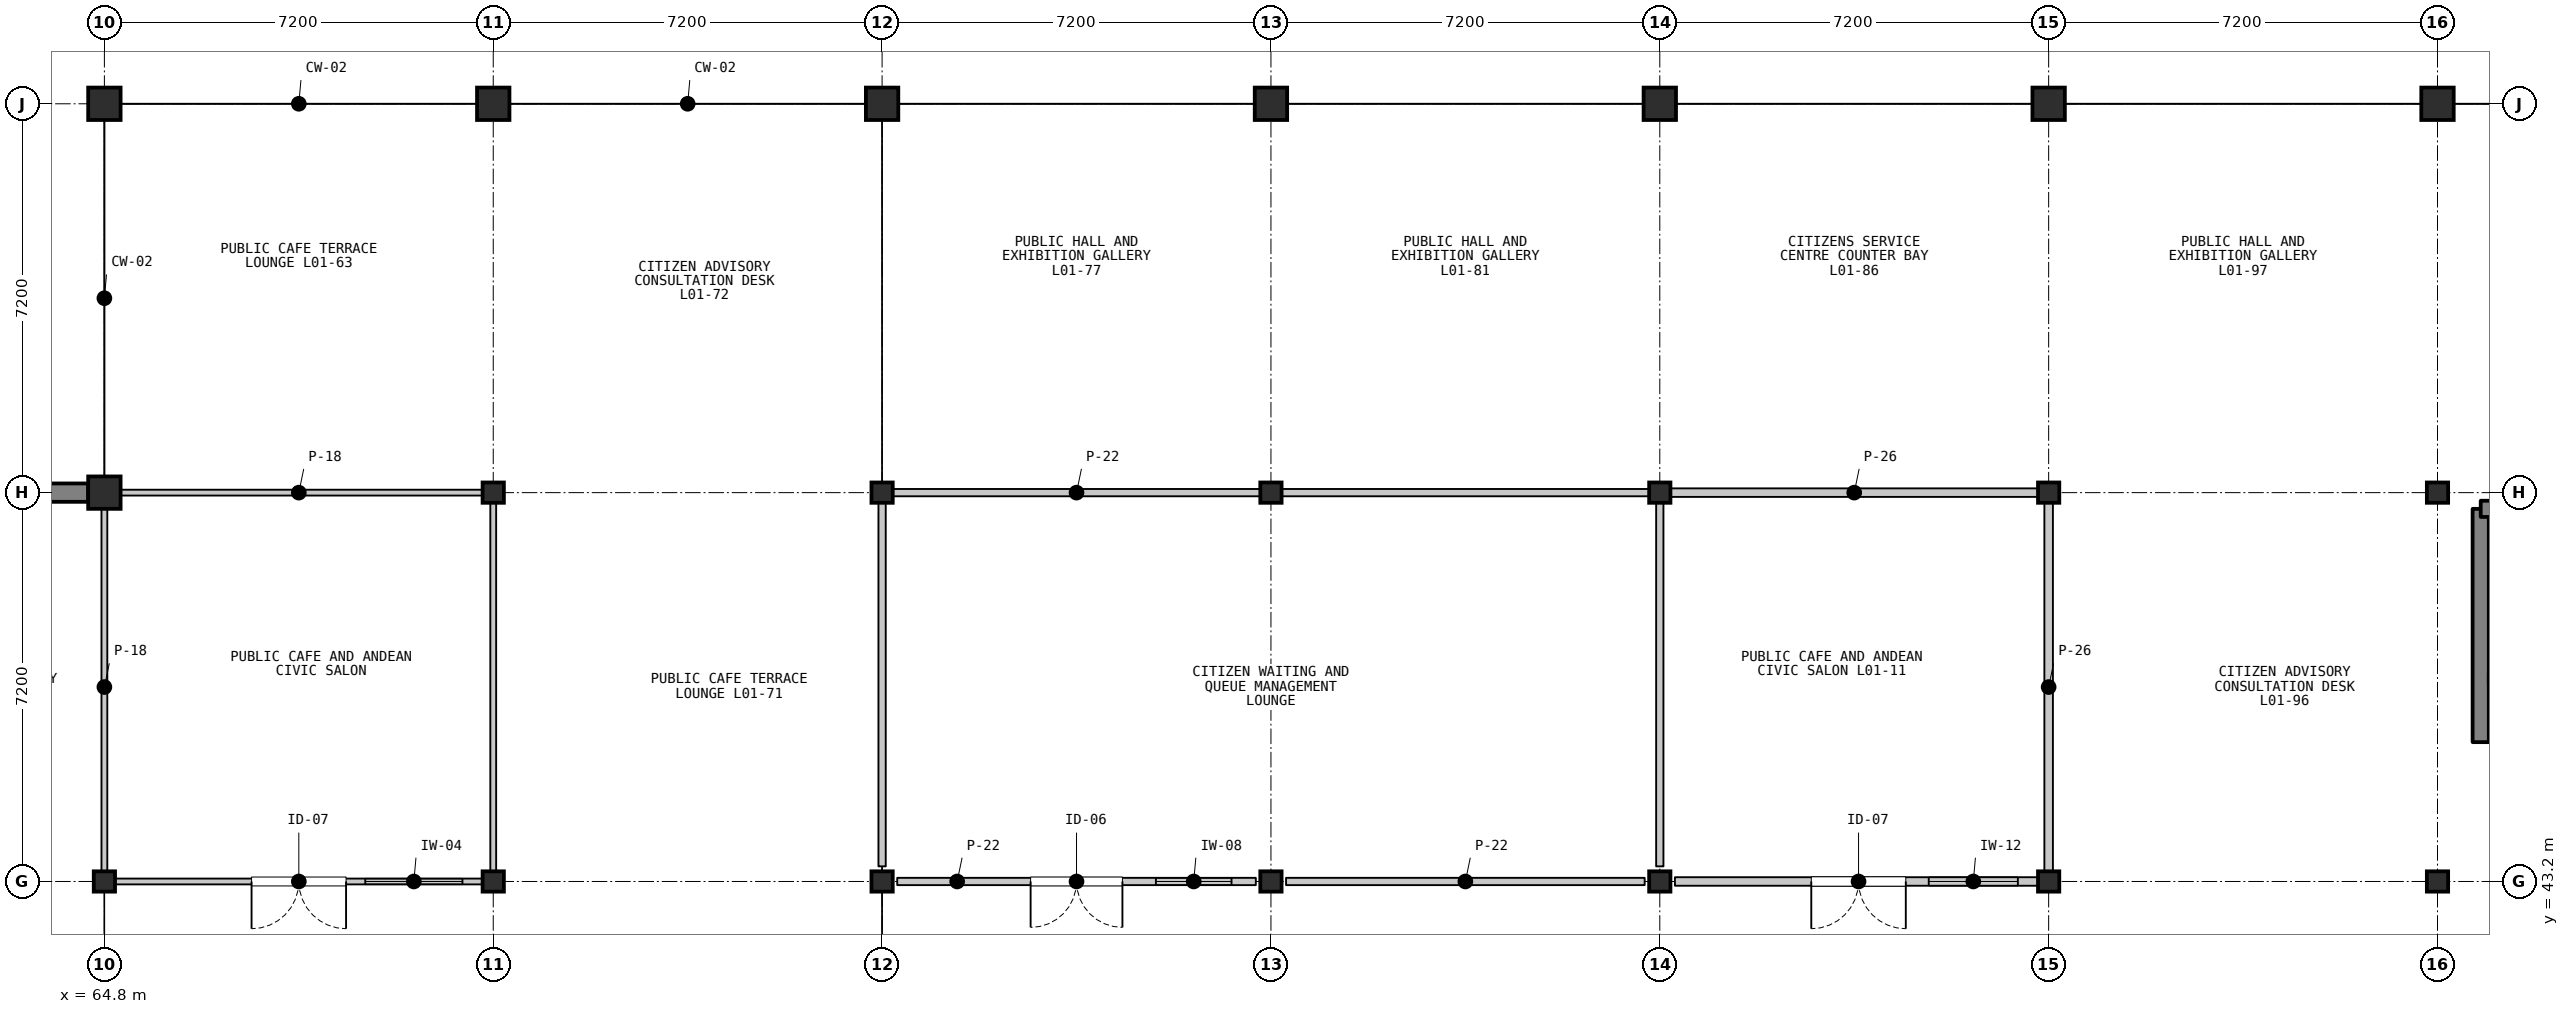
"""IFC4 building model, lengths in metres.
Left out: names, types, materials, properties, quantities, classifications, styles, units other than length and angle.
Written with IfcOpenShell. Run it as: python <this file> out.ifc"""

import sys

from ifc_helpers import new_model, si_unit, direction, frame, frame_2d, origin, origin_2d, place, context, subcontext, project, spatial, rectangle, i_section, extrude, element, fill, save


model = new_model("IFC4")
c1 = context("Model", 3, precision=1e-05, world=origin(), true_north=direction((0.0, 1.0)))
c2 = subcontext(c1, "Body", "Model", "MODEL_VIEW")
j1 = project(units=[si_unit("LENGTHUNIT", "METRE"), si_unit("PLANEANGLEUNIT", "RADIAN")], contexts=[c1])
p1 = place(None, origin())
s1 = spatial("IfcSite", under=j1, at=p1, CompositionType="ELEMENT")
p2 = place(p1, origin())
s2 = spatial("IfcBuilding", under=s1, at=p2, CompositionType="ELEMENT")
p3 = place(p2, origin())
s3 = spatial("IfcBuildingStorey", under=s2, at=p3, CompositionType="ELEMENT", Elevation=0.0)
p4 = place(p3, frame((64.8, 43.2, 0.0), z_axis=(0.0, 0.0, 1.0), x_axis=(1.0, 0.0, 0.0)))
e1 = element("IfcColumn", 1, at=p4, inside=s3, PredefinedType="COLUMN", context=c2, shape_type="SweptSolid", body=[
    extrude(i_section(OverallWidth=0.394, OverallDepth=0.376, WebThickness=0.017, FlangeThickness=0.028, FilletRadius=0.015, at=origin_2d()), origin(), (0.0, 0.0, 1.0), 5.4),
])
for number, where, z_axis, x_axis in (
    (2, (64.8, 50.4, 0.0), (0.0, 0.0, 1.0), (1.0, 0.0, 0.0)),
    (3, (64.8, 57.6, 0.0), (0.0, 0.0, 1.0), (1.0, 0.0, 0.0)),
):
    element("IfcColumn", number, at=place(p3, frame(where, z_axis=z_axis, x_axis=x_axis)), inside=s3, PredefinedType="COLUMN", context=c2, shape_type="SweptSolid", body=[
        extrude(rectangle(XDim=0.6, YDim=0.6, at=origin_2d()), origin(), (0.0, 0.0, 1.0), 5.4),
    ])
for number, where, z_axis, x_axis in (
    (4, (72.0, 43.2, 0.0), (0.0, 0.0, 1.0), (1.0, 0.0, 0.0)),
    (5, (72.0, 50.4, 0.0), (0.0, 0.0, 1.0), (1.0, 0.0, 0.0)),
):
    element("IfcColumn", number, at=place(p3, frame(where, z_axis=z_axis, x_axis=x_axis)), inside=s3, PredefinedType="COLUMN", context=c2, shape_type="SweptSolid", body=[
        extrude(i_section(OverallWidth=0.394, OverallDepth=0.376, WebThickness=0.017, FlangeThickness=0.028, FilletRadius=0.015, at=origin_2d()), origin(), (0.0, 0.0, 1.0), 5.4),
    ])
p5 = place(p3, frame((72.0, 57.6, 0.0), z_axis=(0.0, 0.0, 1.0), x_axis=(1.0, 0.0, 0.0)))
e6 = element("IfcColumn", 6, at=p5, inside=s3, PredefinedType="COLUMN", context=c2, shape_type="SweptSolid", body=[
    extrude(rectangle(XDim=0.6, YDim=0.6, at=origin_2d()), origin(), (0.0, 0.0, 1.0), 5.4),
])
for number, where, z_axis, x_axis in (
    (7, (79.2, 43.2, 0.0), (0.0, 0.0, 1.0), (1.0, 0.0, 0.0)),
    (8, (79.2, 50.4, 0.0), (0.0, 0.0, 1.0), (1.0, 0.0, 0.0)),
):
    element("IfcColumn", number, at=place(p3, frame(where, z_axis=z_axis, x_axis=x_axis)), inside=s3, PredefinedType="COLUMN", context=c2, shape_type="SweptSolid", body=[
        extrude(i_section(OverallWidth=0.394, OverallDepth=0.376, WebThickness=0.017, FlangeThickness=0.028, FilletRadius=0.015, at=origin_2d()), origin(), (0.0, 0.0, 1.0), 5.4),
    ])
p6 = place(p3, frame((79.2, 57.6, 0.0), z_axis=(0.0, 0.0, 1.0), x_axis=(1.0, 0.0, 0.0)))
e9 = element("IfcColumn", 9, at=p6, inside=s3, PredefinedType="COLUMN", context=c2, shape_type="SweptSolid", body=[
    extrude(rectangle(XDim=0.6, YDim=0.6, at=origin_2d()), origin(), (0.0, 0.0, 1.0), 5.4),
])
for number, where, z_axis, x_axis in (
    (10, (86.4, 43.2, 0.0), (0.0, 0.0, 1.0), (1.0, 0.0, 0.0)),
    (11, (86.4, 50.4, 0.0), (0.0, 0.0, 1.0), (1.0, 0.0, 0.0)),
):
    element("IfcColumn", number, at=place(p3, frame(where, z_axis=z_axis, x_axis=x_axis)), inside=s3, PredefinedType="COLUMN", context=c2, shape_type="SweptSolid", body=[
        extrude(i_section(OverallWidth=0.394, OverallDepth=0.376, WebThickness=0.017, FlangeThickness=0.028, FilletRadius=0.015, at=origin_2d()), origin(), (0.0, 0.0, 1.0), 5.4),
    ])
p7 = place(p3, frame((86.4, 57.6, 0.0), z_axis=(0.0, 0.0, 1.0), x_axis=(1.0, 0.0, 0.0)))
e12 = element("IfcColumn", 12, at=p7, inside=s3, PredefinedType="COLUMN", context=c2, shape_type="SweptSolid", body=[
    extrude(rectangle(XDim=0.6, YDim=0.6, at=origin_2d()), origin(), (0.0, 0.0, 1.0), 5.4),
])
for number, where, z_axis, x_axis in (
    (13, (93.6, 43.2, 0.0), (0.0, 0.0, 1.0), (1.0, 0.0, 0.0)),
    (14, (93.6, 50.4, 0.0), (0.0, 0.0, 1.0), (1.0, 0.0, 0.0)),
):
    element("IfcColumn", number, at=place(p3, frame(where, z_axis=z_axis, x_axis=x_axis)), inside=s3, PredefinedType="COLUMN", context=c2, shape_type="SweptSolid", body=[
        extrude(i_section(OverallWidth=0.394, OverallDepth=0.376, WebThickness=0.017, FlangeThickness=0.028, FilletRadius=0.015, at=origin_2d()), origin(), (0.0, 0.0, 1.0), 5.4),
    ])
p8 = place(p3, frame((93.6, 57.6, 0.0), z_axis=(0.0, 0.0, 1.0), x_axis=(1.0, 0.0, 0.0)))
e15 = element("IfcColumn", 15, at=p8, inside=s3, PredefinedType="COLUMN", context=c2, shape_type="SweptSolid", body=[
    extrude(rectangle(XDim=0.6, YDim=0.6, at=origin_2d()), origin(), (0.0, 0.0, 1.0), 5.4),
])
for number, where, z_axis, x_axis in (
    (16, (100.8, 43.2, 0.0), (0.0, 0.0, 1.0), (1.0, 0.0, 0.0)),
    (17, (100.8, 50.4, 0.0), (0.0, 0.0, 1.0), (1.0, 0.0, 0.0)),
):
    element("IfcColumn", number, at=place(p3, frame(where, z_axis=z_axis, x_axis=x_axis)), inside=s3, PredefinedType="COLUMN", context=c2, shape_type="SweptSolid", body=[
        extrude(i_section(OverallWidth=0.394, OverallDepth=0.376, WebThickness=0.017, FlangeThickness=0.028, FilletRadius=0.015, at=origin_2d()), origin(), (0.0, 0.0, 1.0), 5.4),
    ])
p9 = place(p3, frame((100.8, 57.6, 0.0), z_axis=(0.0, 0.0, 1.0), x_axis=(1.0, 0.0, 0.0)))
e18 = element("IfcColumn", 18, at=p9, inside=s3, PredefinedType="COLUMN", context=c2, shape_type="SweptSolid", body=[
    extrude(rectangle(XDim=0.6, YDim=0.6, at=origin_2d()), origin(), (0.0, 0.0, 1.0), 5.4),
])
for number, where, z_axis, x_axis in (
    (19, (108.0, 43.2, 0.0), (0.0, 0.0, 1.0), (1.0, 0.0, 0.0)),
    (20, (108.0, 50.4, 0.0), (0.0, 0.0, 1.0), (1.0, 0.0, 0.0)),
):
    element("IfcColumn", number, at=place(p3, frame(where, z_axis=z_axis, x_axis=x_axis)), inside=s3, PredefinedType="COLUMN", context=c2, shape_type="SweptSolid", body=[
        extrude(i_section(OverallWidth=0.394, OverallDepth=0.376, WebThickness=0.017, FlangeThickness=0.028, FilletRadius=0.015, at=origin_2d()), origin(), (0.0, 0.0, 1.0), 5.4),
    ])
p10 = place(p3, frame((108.0, 57.6, 0.0), z_axis=(0.0, 0.0, 1.0), x_axis=(1.0, 0.0, 0.0)))
e21 = element("IfcColumn", 21, at=p10, inside=s3, PredefinedType="COLUMN", context=c2, shape_type="SweptSolid", body=[
    extrude(rectangle(XDim=0.6, YDim=0.6, at=origin_2d()), origin(), (0.0, 0.0, 1.0), 5.4),
])
p11 = place(p3, frame((57.9, 50.4, 0.0), z_axis=(0.0, 0.0, 1.0), x_axis=(1.0, 0.0, 0.0)))
e22 = element("IfcWall", 22, at=p11, inside=s3, PredefinedType="SOLIDWALL", context=c2, shape_type="SweptSolid", body=[
    extrude(rectangle(XDim=6.6, YDim=0.34, at=frame_2d((3.3, 0.0))), origin(), (0.0, 0.0, 1.0), 4.598),
])
p12 = place(p11, frame((0.984, 0.0, 0.95)))
e23 = element("IfcOpeningElement", 23, at=p12, cuts=e22, PredefinedType="OPENING", context=c2, shape_type="SweptSolid", body=[
    extrude(rectangle(XDim=1.2, YDim=1.7, at=frame_2d((0.6, 0.85))), frame((0.0, 0.18, 0.0), z_axis=(0.0, -1.0, 0.0), x_axis=(1.0, 0.0, 0.0)), (0.0, 0.0, 1.0), 0.36),
])
p13 = place(p11, frame((4.416, 0.0, 0.95)))
e24 = element("IfcOpeningElement", 24, at=p13, cuts=e22, PredefinedType="OPENING", context=c2, shape_type="SweptSolid", body=[
    extrude(rectangle(XDim=1.2, YDim=1.7, at=frame_2d((0.6, 0.85))), frame((0.0, 0.18, 0.0), z_axis=(0.0, -1.0, 0.0), x_axis=(1.0, 0.0, 0.0)), (0.0, 0.0, 1.0), 0.36),
])
p14 = place(p3, frame((108.8, 45.78, 0.0), z_axis=(0.0, 0.0, 1.0), x_axis=(0.0, 1.0, 0.0)))
e25 = element("IfcWall", 25, at=p14, inside=s3, PredefinedType="SHEAR", context=c2, shape_type="SweptSolid", body=[
    extrude(rectangle(XDim=4.32, YDim=0.3, at=frame_2d((2.16, 0.0))), origin(), (0.0, 0.0, 1.0), 5.2),
])
p15 = place(p3, frame((108.8, 50.1, 0.0), z_axis=(0.0, 0.0, 1.0), x_axis=(1.0, 0.0, 0.0)))
e26 = element("IfcWall", 26, at=p15, inside=s3, PredefinedType="SHEAR", context=c2, shape_type="SweptSolid", body=[
    extrude(rectangle(XDim=5.92, YDim=0.3, at=frame_2d((2.96, 0.0))), origin(), (0.0, 0.0, 1.0), 5.2),
])
p16 = place(p3, frame((108.95, 46.95, 0.0), z_axis=(0.0, 0.0, 1.0), x_axis=(1.0, 0.0, 0.0)))
e27 = element("IfcWall", 27, at=p16, inside=s3, PredefinedType="SHEAR", context=c2, shape_type="SweptSolid", body=[
    extrude(rectangle(XDim=2.4, YDim=0.22, at=frame_2d((1.2, 0.0))), origin(), (0.0, 0.0, 1.0), 5.2),
])
p17 = place(p3, frame((71.88, 43.2, 0.0), z_axis=(0.0, 0.0, 1.0), x_axis=(-1.0, 0.0, 0.0)))
e28 = element("IfcWall", 28, at=p17, inside=s3, PredefinedType="PARTITIONING", context=c2, shape_type="SweptSolid", body=[
    extrude(rectangle(XDim=6.96, YDim=0.108, at=frame_2d((3.48, 0.0))), origin(), (0.0, 0.0, 1.0), 4.588),
])
p18 = place(p17, frame((2.605, 0.0, 0.0)))
e29 = element("IfcOpeningElement", 29, at=p18, cuts=e28, PredefinedType="OPENING", context=c2, shape_type="SweptSolid", body=[
    extrude(rectangle(XDim=1.75, YDim=2.4, at=frame_2d((0.875, 1.2))), frame((0.0, 0.064, 0.0), z_axis=(0.0, -1.0, 0.0), x_axis=(1.0, 0.0, 0.0)), (0.0, 0.0, 1.0), 0.128),
])
p19 = place(p17, frame((0.45, 0.0, 1.05)))
e30 = element("IfcOpeningElement", 30, at=p19, cuts=e28, PredefinedType="OPENING", context=c2, shape_type="SweptSolid", body=[
    extrude(rectangle(XDim=1.8, YDim=1.4, at=frame_2d((0.9, 0.7))), frame((0.0, 0.064, 0.0), z_axis=(0.0, -1.0, 0.0), x_axis=(1.0, 0.0, 0.0)), (0.0, 0.0, 1.0), 0.128),
])
for number, where, z_axis, x_axis in (
    (31, (64.92, 50.4, 0.0), (0.0, 0.0, 1.0), (1.0, 0.0, 0.0)),
    (32, (64.8, 43.32, 0.0), (0.0, 0.0, 1.0), (0.0, 1.0, 0.0)),
    (33, (72.0, 50.28, 0.0), (0.0, 0.0, 1.0), (0.0, -1.0, 0.0)),
):
    element("IfcWall", number, at=place(p3, frame(where, z_axis=z_axis, x_axis=x_axis)), inside=s3, PredefinedType="PARTITIONING", context=c2, shape_type="SweptSolid", body=[
        extrude(rectangle(XDim=6.96, YDim=0.108, at=frame_2d((3.48, 0.0))), origin(), (0.0, 0.0, 1.0), 4.588),
    ])
p20 = place(p3, frame((86.12, 43.2, 0.0), z_axis=(0.0, 0.0, 1.0), x_axis=(-1.0, 0.0, 0.0)))
e34 = element("IfcWall", 34, at=p20, inside=s3, PredefinedType="PARTITIONING", context=c2, shape_type="SweptSolid", body=[
    extrude(rectangle(XDim=6.64, YDim=0.135, at=frame_2d((3.32, 0.0))), origin(), (0.0, 0.0, 1.0), 4.588),
])
p21 = place(p20, frame((2.47, 0.0, 0.0)))
e35 = element("IfcOpeningElement", 35, at=p21, cuts=e34, PredefinedType="OPENING", context=c2, shape_type="SweptSolid", body=[
    extrude(rectangle(XDim=1.7, YDim=2.35, at=frame_2d((0.85, 1.175))), frame((0.0, 0.077, 0.0), z_axis=(0.0, -1.0, 0.0), x_axis=(1.0, 0.0, 0.0)), (0.0, 0.0, 1.0), 0.155),
])
p22 = place(p20, frame((0.45, 0.0, 1.05)))
e36 = element("IfcOpeningElement", 36, at=p22, cuts=e34, PredefinedType="OPENING", context=c2, shape_type="SweptSolid", body=[
    extrude(rectangle(XDim=1.4, YDim=1.2, at=frame_2d((0.7, 0.6))), frame((0.0, 0.077, 0.0), z_axis=(0.0, -1.0, 0.0), x_axis=(1.0, 0.0, 0.0)), (0.0, 0.0, 1.0), 0.155),
])
p23 = place(p3, frame((93.32, 43.2, 0.0), z_axis=(0.0, 0.0, 1.0), x_axis=(-1.0, 0.0, 0.0)))
e37 = element("IfcWall", 37, at=p23, inside=s3, PredefinedType="PARTITIONING", context=c2, shape_type="SweptSolid", body=[
    extrude(rectangle(XDim=6.64, YDim=0.135, at=frame_2d((3.32, 0.0))), origin(), (0.0, 0.0, 1.0), 4.588),
])
for number, where, z_axis, x_axis in (
    (38, (79.32, 50.4, 0.0), (0.0, 0.0, 1.0), (1.0, 0.0, 0.0)),
    (39, (86.52, 50.4, 0.0), (0.0, 0.0, 1.0), (1.0, 0.0, 0.0)),
):
    element("IfcWall", number, at=place(p3, frame(where, z_axis=z_axis, x_axis=x_axis)), inside=s3, PredefinedType="PARTITIONING", context=c2, shape_type="SweptSolid", body=[
        extrude(rectangle(XDim=6.96, YDim=0.135, at=frame_2d((3.48, 0.0))), origin(), (0.0, 0.0, 1.0), 4.588),
    ])
for number, where, z_axis, x_axis in (
    (40, (79.2, 43.48, 0.0), (0.0, 0.0, 1.0), (0.0, 1.0, 0.0)),
    (41, (93.6, 50.28, 0.0), (0.0, 0.0, 1.0), (0.0, -1.0, 0.0)),
):
    element("IfcWall", number, at=place(p3, frame(where, z_axis=z_axis, x_axis=x_axis)), inside=s3, PredefinedType="PARTITIONING", context=c2, shape_type="SweptSolid", body=[
        extrude(rectangle(XDim=6.8, YDim=0.135, at=frame_2d((3.4, 0.0))), origin(), (0.0, 0.0, 1.0), 4.588),
    ])
p24 = place(p3, frame((100.68, 43.2, 0.0), z_axis=(0.0, 0.0, 1.0), x_axis=(-1.0, 0.0, 0.0)))
e42 = element("IfcWall", 42, at=p24, inside=s3, PredefinedType="PARTITIONING", context=c2, shape_type="SweptSolid", body=[
    extrude(rectangle(XDim=6.8, YDim=0.158, at=frame_2d((3.4, 0.0))), origin(), (0.0, 0.0, 1.0), 4.588),
])
p25 = place(p24, frame((2.525, 0.0, 0.0)))
e43 = element("IfcOpeningElement", 43, at=p25, cuts=e42, PredefinedType="OPENING", context=c2, shape_type="SweptSolid", body=[
    extrude(rectangle(XDim=1.75, YDim=2.4, at=frame_2d((0.875, 1.2))), frame((0.0, 0.089, 0.0), z_axis=(0.0, -1.0, 0.0), x_axis=(1.0, 0.0, 0.0)), (0.0, 0.0, 1.0), 0.178),
])
p26 = place(p24, frame((0.45, 0.0, 1.05)))
e44 = element("IfcOpeningElement", 44, at=p26, cuts=e42, PredefinedType="OPENING", context=c2, shape_type="SweptSolid", body=[
    extrude(rectangle(XDim=1.65, YDim=1.15, at=frame_2d((0.825, 0.575))), frame((0.0, 0.089, 0.0), z_axis=(0.0, -1.0, 0.0), x_axis=(1.0, 0.0, 0.0)), (0.0, 0.0, 1.0), 0.178),
])
p27 = place(p3, frame((93.72, 50.4, 0.0), z_axis=(0.0, 0.0, 1.0), x_axis=(1.0, 0.0, 0.0)))
e45 = element("IfcWall", 45, at=p27, inside=s3, PredefinedType="PARTITIONING", context=c2, shape_type="SweptSolid", body=[
    extrude(rectangle(XDim=6.96, YDim=0.158, at=frame_2d((3.48, 0.0))), origin(), (0.0, 0.0, 1.0), 4.588),
])
p28 = place(p3, frame((100.8, 50.28, 0.0), z_axis=(0.0, 0.0, 1.0), x_axis=(0.0, -1.0, 0.0)))
e46 = element("IfcWall", 46, at=p28, inside=s3, PredefinedType="PARTITIONING", context=c2, shape_type="SweptSolid", body=[
    extrude(rectangle(XDim=6.96, YDim=0.158, at=frame_2d((3.48, 0.0))), origin(), (0.0, 0.0, 1.0), 4.428),
])
p29 = place(p18, origin())
e47 = element("IfcDoor", 47, at=p29, inside=s3, OperationType="DOUBLE_DOOR_SINGLE_SWING", PredefinedType="DOOR", context=c2, shape_type="SweptSolid", body=[
    extrude(rectangle(XDim=1.75, YDim=2.4, at=frame_2d((0.875, 1.2))), frame((0.0, 0.025, 0.0), z_axis=(0.0, -1.0, 0.0), x_axis=(1.0, 0.0, 0.0)), (0.0, 0.0, 1.0), 0.05),
])
fill(e29, e47)
p30 = place(p19, origin())
e48 = element("IfcWindow", 48, at=p30, inside=s3, PartitioningType="SINGLE_PANEL", PredefinedType="WINDOW", context=c2, shape_type="SweptSolid", body=[
    extrude(rectangle(XDim=1.8, YDim=1.4, at=frame_2d((0.9, 0.7))), frame((0.0, 0.03, 0.0), z_axis=(0.0, -1.0, 0.0), x_axis=(1.0, 0.0, 0.0)), (0.0, 0.0, 1.0), 0.06),
])
fill(e30, e48)
p31 = place(p21, origin())
e49 = element("IfcDoor", 49, at=p31, inside=s3, OperationType="DOUBLE_DOOR_SINGLE_SWING", PredefinedType="DOOR", context=c2, shape_type="SweptSolid", body=[
    extrude(rectangle(XDim=1.7, YDim=2.35, at=frame_2d((0.85, 1.175))), frame((0.0, 0.025, 0.0), z_axis=(0.0, -1.0, 0.0), x_axis=(1.0, 0.0, 0.0)), (0.0, 0.0, 1.0), 0.05),
])
fill(e35, e49)
p32 = place(p22, origin())
e50 = element("IfcWindow", 50, at=p32, inside=s3, PartitioningType="SINGLE_PANEL", PredefinedType="WINDOW", context=c2, shape_type="SweptSolid", body=[
    extrude(rectangle(XDim=1.4, YDim=1.2, at=frame_2d((0.7, 0.6))), frame((0.0, 0.03, 0.0), z_axis=(0.0, -1.0, 0.0), x_axis=(1.0, 0.0, 0.0)), (0.0, 0.0, 1.0), 0.06),
])
fill(e36, e50)
p33 = place(p25, origin())
e51 = element("IfcDoor", 51, at=p33, inside=s3, OperationType="DOUBLE_DOOR_SINGLE_SWING", PredefinedType="DOOR", context=c2, shape_type="SweptSolid", body=[
    extrude(rectangle(XDim=1.75, YDim=2.4, at=frame_2d((0.875, 1.2))), frame((0.0, 0.025, 0.0), z_axis=(0.0, -1.0, 0.0), x_axis=(1.0, 0.0, 0.0)), (0.0, 0.0, 1.0), 0.05),
])
fill(e43, e51)
p34 = place(p26, origin())
e52 = element("IfcWindow", 52, at=p34, inside=s3, PartitioningType="SINGLE_PANEL", PredefinedType="WINDOW", context=c2, shape_type="SweptSolid", body=[
    extrude(rectangle(XDim=1.65, YDim=1.15, at=frame_2d((0.825, 0.575))), frame((0.0, 0.03, 0.0), z_axis=(0.0, -1.0, 0.0), x_axis=(1.0, 0.0, 0.0)), (0.0, 0.0, 1.0), 0.06),
])
fill(e44, e52)
save(model, sys.argv[1])
